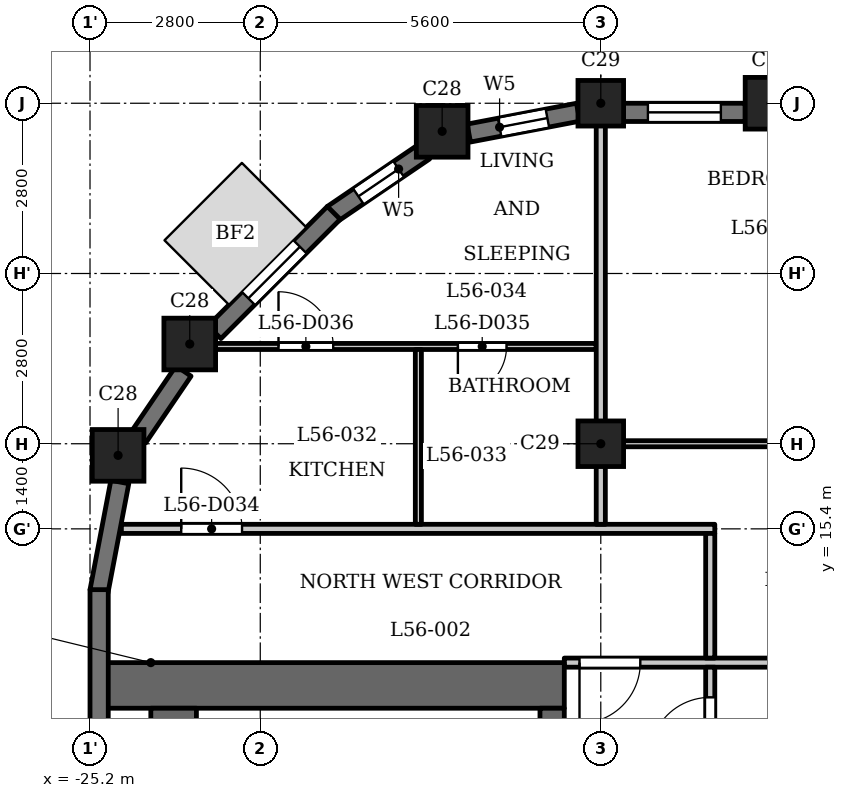
"""IFC4 building model, lengths in metres.
Left out: names, types, materials, properties, quantities, classifications, styles, units other than length and angle.
Written with IfcOpenShell. Run it as: python <this file> out.ifc"""

import sys

from ifc_helpers import new_model, si_unit, direction, frame, frame_2d, origin, origin_2d, place, context, subcontext, project, spatial, rectangle, extrude, element, fill, save


model = new_model("IFC4")
c1 = context("Model", 3, precision=1e-05, world=origin(), true_north=direction((0.0, 1.0)))
c2 = subcontext(c1, "Body", "Model", "MODEL_VIEW")
j1 = project(units=[si_unit("LENGTHUNIT", "METRE"), si_unit("PLANEANGLEUNIT", "RADIAN")], contexts=[c1])
p1 = place(None, origin())
s1 = spatial("IfcSite", under=j1, at=p1, CompositionType="ELEMENT")
p2 = place(p1, origin())
s2 = spatial("IfcBuilding", under=s1, at=p2, CompositionType="ELEMENT")
p3 = place(p2, frame((0.0, 0.0, 216.9)))
s3 = spatial("IfcBuildingStorey", under=s2, at=p3, CompositionType="ELEMENT", Elevation=216.9)
for number, where, z_axis, x_axis in (
    (1, (-14.0, 22.4, 0.0), (0.0, 0.0, 1.0), (1.0, 0.0, 0.0)),
    (2, (-19.409, 21.938, 0.0), (0.0, 0.0, 1.0), (1.0, 0.0, 0.0)),
    (3, (-23.56, 18.44, 0.0), (0.0, 0.0, 1.0), (1.0, 0.0, 0.0)),
    (4, (-24.738, 16.609, 0.0), (0.0, 0.0, 1.0), (1.0, 0.0, 0.0)),
):
    element("IfcColumn", number, at=place(p3, frame(where, z_axis=z_axis, x_axis=x_axis)), inside=s3, PredefinedType="COLUMN", context=c2, shape_type="SweptSolid", body=[
        extrude(rectangle(XDim=0.85, YDim=0.85, at=origin_2d()), origin(), (0.0, 0.0, 1.0), 3.5),
    ])
for number, where, z_axis, x_axis in (
    (5, (-16.8, 16.8, 0.0), (0.0, 0.0, 1.0), (1.0, 0.0, 0.0)),
    (6, (-16.8, 22.4, 0.0), (0.0, 0.0, 1.0), (1.0, 0.0, 0.0)),
):
    element("IfcColumn", number, at=place(p3, frame(where, z_axis=z_axis, x_axis=x_axis)), inside=s3, PredefinedType="COLUMN", context=c2, shape_type="SweptSolid", body=[
        extrude(rectangle(XDim=0.75, YDim=0.75, at=origin_2d()), origin(), (0.0, 0.0, 1.0), 3.5),
    ])
p4 = place(p3, frame((-14.425, 22.25, 0.0), z_axis=(0.0, 0.0, 1.0), x_axis=(-1.0, 0.0, 0.0)))
e7 = element("IfcWall", 7, at=p4, inside=s3, PredefinedType="SOLIDWALL", context=c2, shape_type="SweptSolid", body=[
    extrude(rectangle(XDim=2.0, YDim=0.3, at=frame_2d((1.0, 0.0))), origin(), (0.0, 0.0, 1.0), 2.5),
])
p5 = place(p4, frame((0.4, 0.0, 0.6)))
e8 = element("IfcOpeningElement", 8, at=p5, cuts=e7, PredefinedType="OPENING", context=c2, shape_type="SweptSolid", body=[
    extrude(rectangle(XDim=1.2, YDim=1.55, at=frame_2d((0.6, 0.775))), frame((0.0, 0.16, 0.0), z_axis=(0.0, -1.0, 0.0), x_axis=(1.0, 0.0, 0.0)), (0.0, 0.0, 1.0), 0.32),
])
p6 = place(p3, frame((-17.172, 22.253, 0.0), z_axis=(0.0, 0.0, 1.0), x_axis=(-0.982300037503, -0.187314271538, 0.0)))
e9 = element("IfcWall", 9, at=p6, inside=s3, PredefinedType="SOLIDWALL", context=c2, shape_type="SweptSolid", body=[
    extrude(rectangle(XDim=1.831, YDim=0.3, at=frame_2d((0.916, 0.0))), origin(), (0.0, 0.0, 1.0), 2.5),
])
p7 = place(p6, frame((0.516, 0.0, 0.6)))
e10 = element("IfcOpeningElement", 10, at=p7, cuts=e9, PredefinedType="OPENING", context=c2, shape_type="SweptSolid", body=[
    extrude(rectangle(XDim=0.8, YDim=1.55, at=frame_2d((0.4, 0.775))), frame((0.0, 0.16, 0.0), z_axis=(0.0, -1.0, 0.0), x_axis=(1.0, 0.0, 0.0)), (0.0, 0.0, 1.0), 0.32),
])
p8 = place(p3, frame((-19.698, 21.608, 0.0), z_axis=(0.0, 0.0, 1.0), x_axis=(-0.82705295608, -0.562124014644, 0.0)))
e11 = element("IfcWall", 11, at=p8, inside=s3, PredefinedType="SOLIDWALL", context=c2, shape_type="SweptSolid", body=[
    extrude(rectangle(XDim=1.831, YDim=0.3, at=frame_2d((0.916, 0.0))), origin(), (0.0, 0.0, 1.0), 2.5),
])
p9 = place(p8, frame((0.516, 0.0, 0.6)))
e12 = element("IfcOpeningElement", 12, at=p9, cuts=e11, PredefinedType="OPENING", context=c2, shape_type="SweptSolid", body=[
    extrude(rectangle(XDim=0.8, YDim=1.55, at=frame_2d((0.4, 0.775))), frame((0.0, 0.16, 0.0), z_axis=(0.0, -1.0, 0.0), x_axis=(1.0, 0.0, 0.0)), (0.0, 0.0, 1.0), 0.32),
])
p10 = place(p3, frame((-21.191, 20.597, 0.0), z_axis=(0.0, 0.0, 1.0), x_axis=(-0.707150767798, -0.707062791838, 0.0)))
e13 = element("IfcWall", 13, at=p10, inside=s3, PredefinedType="SOLIDWALL", context=c2, shape_type="SweptSolid", body=[
    extrude(rectangle(XDim=2.775, YDim=0.3, at=frame_2d((1.388, 0.0))), origin(), (0.0, 0.0, 1.0), 2.5),
])
p11 = place(p10, frame((0.788, 0.0, 0.6)))
e14 = element("IfcOpeningElement", 14, at=p11, cuts=e13, PredefinedType="OPENING", context=c2, shape_type="SweptSolid", body=[
    extrude(rectangle(XDim=1.2, YDim=1.55, at=frame_2d((0.6, 0.775))), frame((0.0, 0.16, 0.0), z_axis=(0.0, -1.0, 0.0), x_axis=(1.0, 0.0, 0.0)), (0.0, 0.0, 1.0), 0.32),
])
p12 = place(p3, frame((-23.662, 17.996, 0.0), z_axis=(0.0, 0.0, 1.0), x_axis=(-0.562149004813, -0.827035970432, 0.0)))
e15 = element("IfcWall", 15, at=p12, inside=s3, PredefinedType="SOLIDWALL", context=c2, shape_type="SweptSolid", body=[
    extrude(rectangle(XDim=1.327, YDim=0.3, at=frame_2d((0.664, 0.0))), origin(), (0.0, 0.0, 1.0), 2.5),
])
p13 = place(p3, frame((-24.709, 16.171, 0.0), z_axis=(0.0, 0.0, 1.0), x_axis=(-0.187442908742, -0.982275499014, 0.0)))
e16 = element("IfcWall", 16, at=p13, inside=s3, PredefinedType="SOLIDWALL", context=c2, shape_type="SweptSolid", body=[
    extrude(rectangle(XDim=1.831, YDim=0.3, at=frame_2d((0.916, 0.0))), origin(), (0.0, 0.0, 1.0), 2.5),
])
p14 = place(p3, frame((-25.05, 14.4, 0.0), z_axis=(0.0, 0.0, 1.0), x_axis=(0.0, -1.0, 0.0)))
e17 = element("IfcWall", 17, at=p14, inside=s3, PredefinedType="SOLIDWALL", context=c2, shape_type="SweptSolid", body=[
    extrude(rectangle(XDim=2.775, YDim=0.3, at=frame_2d((1.387, 0.0))), origin(), (0.0, 0.0, 1.0), 2.5),
])
p15 = place(p3, frame((-17.4, 12.825, 0.0), z_axis=(0.0, 0.0, 1.0), x_axis=(-1.0, 0.0, 0.0)))
e18 = element("IfcWall", 18, at=p15, inside=s3, PredefinedType="SHEAR", context=c2, shape_type="SweptSolid", body=[
    extrude(rectangle(XDim=7.6, YDim=0.75, at=frame_2d((3.8, 0.0))), origin(), (0.0, 0.0, 1.0), 3.2),
])
p16 = place(p3, frame((-17.6, -12.45, 0.0), z_axis=(0.0, 0.0, 1.0), x_axis=(0.0, 1.0, 0.0)))
e19 = element("IfcWall", 19, at=p16, inside=s3, PredefinedType="SHEAR", context=c2, shape_type="SweptSolid", body=[
    extrude(rectangle(XDim=24.9, YDim=0.4, at=frame_2d((12.45, 0.0))), origin(), (0.0, 0.0, 1.0), 3.2),
])
p17 = place(p16, frame((6.85, 0.0, 0.0)))
e20 = element("IfcOpeningElement", 20, at=p17, cuts=e19, PredefinedType="OPENING", context=c2, shape_type="SweptSolid", body=[
    extrude(rectangle(XDim=0.9, YDim=2.1, at=frame_2d((0.45, 1.05))), frame((0.0, 0.21, 0.0), z_axis=(0.0, -1.0, 0.0), x_axis=(1.0, 0.0, 0.0)), (0.0, 0.0, 1.0), 0.42),
])
p18 = place(p16, frame((10.45, 0.0, 0.0)))
e21 = element("IfcOpeningElement", 21, at=p18, cuts=e19, PredefinedType="OPENING", context=c2, shape_type="SweptSolid", body=[
    extrude(rectangle(XDim=0.9, YDim=2.1, at=frame_2d((0.45, 1.05))), frame((0.0, 0.21, 0.0), z_axis=(0.0, -1.0, 0.0), x_axis=(1.0, 0.0, 0.0)), (0.0, 0.0, 1.0), 0.42),
])
p19 = place(p16, frame((15.6, 0.0, 0.0)))
e22 = element("IfcOpeningElement", 22, at=p19, cuts=e19, PredefinedType="OPENING", context=c2, shape_type="SweptSolid", body=[
    extrude(rectangle(XDim=1.1, YDim=2.1, at=frame_2d((0.55, 1.05))), frame((0.0, 0.21, 0.0), z_axis=(0.0, -1.0, 0.0), x_axis=(1.0, 0.0, 0.0)), (0.0, 0.0, 1.0), 0.42),
])
p20 = place(p16, frame((18.0, 0.0, 0.0)))
e23 = element("IfcOpeningElement", 23, at=p20, cuts=e19, PredefinedType="OPENING", context=c2, shape_type="SweptSolid", body=[
    extrude(rectangle(XDim=1.1, YDim=2.1, at=frame_2d((0.55, 1.05))), frame((0.0, 0.21, 0.0), z_axis=(0.0, -1.0, 0.0), x_axis=(1.0, 0.0, 0.0)), (0.0, 0.0, 1.0), 0.42),
])
p21 = place(p16, frame((23.025, 0.0, 0.0)))
e24 = element("IfcOpeningElement", 24, at=p21, cuts=e19, PredefinedType="OPENING", context=c2, shape_type="SweptSolid", body=[
    extrude(rectangle(XDim=1.1, YDim=2.1, at=frame_2d((0.55, 1.05))), frame((0.0, 0.21, 0.0), z_axis=(0.0, -1.0, 0.0), x_axis=(1.0, 0.0, 0.0)), (0.0, 0.0, 1.0), 0.42),
])
p22 = place(p16, frame((0.775, 0.0, 0.0)))
e25 = element("IfcOpeningElement", 25, at=p22, cuts=e19, PredefinedType="OPENING", context=c2, shape_type="SweptSolid", body=[
    extrude(rectangle(XDim=1.1, YDim=2.1, at=frame_2d((0.55, 1.05))), frame((0.0, 0.21, 0.0), z_axis=(0.0, -1.0, 0.0), x_axis=(1.0, 0.0, 0.0)), (0.0, 0.0, 1.0), 0.42),
])
p23 = place(p16, frame((12.925, 0.0, 0.0)))
e26 = element("IfcOpeningElement", 26, at=p23, cuts=e19, PredefinedType="OPENING", context=c2, shape_type="SweptSolid", body=[
    extrude(rectangle(XDim=1.8, YDim=2.1, at=frame_2d((0.9, 1.05))), frame((0.0, 0.21, 0.0), z_axis=(0.0, -1.0, 0.0), x_axis=(1.0, 0.0, 0.0)), (0.0, 0.0, 1.0), 0.42),
])
p24 = place(p3, frame((-23.825, -12.45, 0.0), z_axis=(0.0, 0.0, 1.0), x_axis=(0.0, 1.0, 0.0)))
e27 = element("IfcWall", 27, at=p24, inside=s3, PredefinedType="SHEAR", context=c2, shape_type="SweptSolid", body=[
    extrude(rectangle(XDim=24.9, YDim=0.75, at=frame_2d((12.45, 0.0))), origin(), (0.0, 0.0, 1.0), 3.2),
])
p25 = place(p3, frame((-17.4, 13.2, 0.0), z_axis=(0.0, 0.0, 1.0), x_axis=(1.0, 0.0, 0.0)))
e28 = element("IfcWall", 28, at=p25, inside=s3, PredefinedType="PARTITIONING", context=c2, shape_type="SweptSolid", body=[
    extrude(rectangle(XDim=34.8, YDim=0.15, at=frame_2d((17.4, 0.0))), origin(), (0.0, 0.0, 1.0), 3.2),
])
p26 = place(p25, frame((0.25, 0.0, 0.0)))
e29 = element("IfcOpeningElement", 29, at=p26, cuts=e28, PredefinedType="OPENING", context=c2, shape_type="SweptSolid", body=[
    extrude(rectangle(XDim=1.0, YDim=2.1, at=frame_2d((0.5, 1.05))), frame((0.0, 0.085, 0.0), z_axis=(0.0, -1.0, 0.0), x_axis=(1.0, 0.0, 0.0)), (0.0, 0.0, 1.0), 0.17),
])
p27 = place(p25, frame((33.65, 0.0, 0.0)))
e30 = element("IfcOpeningElement", 30, at=p27, cuts=e28, PredefinedType="OPENING", context=c2, shape_type="SweptSolid", body=[
    extrude(rectangle(XDim=1.0, YDim=2.1, at=frame_2d((0.5, 1.05))), frame((0.0, 0.085, 0.0), z_axis=(0.0, -1.0, 0.0), x_axis=(1.0, 0.0, 0.0)), (0.0, 0.0, 1.0), 0.17),
])
p28 = place(p25, frame((15.75, 0.0, 0.0)))
e31 = element("IfcOpeningElement", 31, at=p28, cuts=e28, PredefinedType="OPENING", context=c2, shape_type="SweptSolid", body=[
    extrude(rectangle(XDim=1.0, YDim=2.1, at=frame_2d((0.5, 1.05))), frame((0.0, 0.085, 0.0), z_axis=(0.0, -1.0, 0.0), x_axis=(1.0, 0.0, 0.0)), (0.0, 0.0, 1.0), 0.17),
])
p29 = place(p25, frame((26.95, 0.0, 0.0)))
e32 = element("IfcOpeningElement", 32, at=p29, cuts=e28, PredefinedType="OPENING", context=c2, shape_type="SweptSolid", body=[
    extrude(rectangle(XDim=1.0, YDim=2.1, at=frame_2d((0.5, 1.05))), frame((0.0, 0.085, 0.0), z_axis=(0.0, -1.0, 0.0), x_axis=(1.0, 0.0, 0.0)), (0.0, 0.0, 1.0), 0.17),
])
p30 = place(p25, frame((29.75, 0.0, 0.0)))
e33 = element("IfcOpeningElement", 33, at=p30, cuts=e28, PredefinedType="OPENING", context=c2, shape_type="SweptSolid", body=[
    extrude(rectangle(XDim=1.0, YDim=2.1, at=frame_2d((0.5, 1.05))), frame((0.0, 0.085, 0.0), z_axis=(0.0, -1.0, 0.0), x_axis=(1.0, 0.0, 0.0)), (0.0, 0.0, 1.0), 0.17),
])
p31 = place(p3, frame((-24.684, 15.4, 0.0), z_axis=(0.0, 0.0, 1.0), x_axis=(1.0, 0.0, 0.0)))
e34 = element("IfcWall", 34, at=p31, inside=s3, PredefinedType="PARTITIONING", context=c2, shape_type="SweptSolid", body=[
    extrude(rectangle(XDim=9.759, YDim=0.15, at=frame_2d((4.879, 0.0))), origin(), (0.0, 0.0, 1.0), 3.2),
])
p32 = place(p31, frame((0.984, 0.0, 0.0)))
e35 = element("IfcOpeningElement", 35, at=p32, cuts=e34, PredefinedType="OPENING", context=c2, shape_type="SweptSolid", body=[
    extrude(rectangle(XDim=1.0, YDim=2.1, at=frame_2d((0.5, 1.05))), frame((0.0, 0.085, 0.0), z_axis=(0.0, -1.0, 0.0), x_axis=(1.0, 0.0, 0.0)), (0.0, 0.0, 1.0), 0.17),
])
p33 = place(p3, frame((-16.725, 16.8, 0.0), z_axis=(0.0, 0.0, 1.0), x_axis=(1.0, 0.0, 0.0)))
e36 = element("IfcWall", 36, at=p33, inside=s3, PredefinedType="PARTITIONING", context=c2, shape_type="SweptSolid", body=[
    extrude(rectangle(XDim=33.45, YDim=0.1, at=frame_2d((16.725, 0.0))), origin(), (0.0, 0.0, 1.0), 3.2),
])
p34 = place(p33, frame((11.675, 0.0, 0.0)))
e37 = element("IfcOpeningElement", 37, at=p34, cuts=e36, PredefinedType="OPENING", context=c2, shape_type="SweptSolid", body=[
    extrude(rectangle(XDim=0.9, YDim=2.1, at=frame_2d((0.45, 1.05))), frame((0.0, 0.06, 0.0), z_axis=(0.0, -1.0, 0.0), x_axis=(1.0, 0.0, 0.0)), (0.0, 0.0, 1.0), 0.12),
])
p35 = place(p33, frame((9.575, 0.0, 0.0)))
e38 = element("IfcOpeningElement", 38, at=p35, cuts=e36, PredefinedType="OPENING", context=c2, shape_type="SweptSolid", body=[
    extrude(rectangle(XDim=0.9, YDim=2.1, at=frame_2d((0.45, 1.05))), frame((0.0, 0.06, 0.0), z_axis=(0.0, -1.0, 0.0), x_axis=(1.0, 0.0, 0.0)), (0.0, 0.0, 1.0), 0.12),
])
p36 = place(p33, frame((17.375, 0.0, 0.0)))
e39 = element("IfcOpeningElement", 39, at=p36, cuts=e36, PredefinedType="OPENING", context=c2, shape_type="SweptSolid", body=[
    extrude(rectangle(XDim=0.8, YDim=2.1, at=frame_2d((0.4, 1.05))), frame((0.0, 0.06, 0.0), z_axis=(0.0, -1.0, 0.0), x_axis=(1.0, 0.0, 0.0)), (0.0, 0.0, 1.0), 0.12),
])
p37 = place(p33, frame((19.525, 0.0, 0.0)))
e40 = element("IfcOpeningElement", 40, at=p37, cuts=e36, PredefinedType="OPENING", context=c2, shape_type="SweptSolid", body=[
    extrude(rectangle(XDim=0.9, YDim=2.1, at=frame_2d((0.45, 1.05))), frame((0.0, 0.06, 0.0), z_axis=(0.0, -1.0, 0.0), x_axis=(1.0, 0.0, 0.0)), (0.0, 0.0, 1.0), 0.12),
])
p38 = place(p33, frame((23.775, 0.0, 0.0)))
e41 = element("IfcOpeningElement", 41, at=p38, cuts=e36, PredefinedType="OPENING", context=c2, shape_type="SweptSolid", body=[
    extrude(rectangle(XDim=0.9, YDim=2.1, at=frame_2d((0.45, 1.05))), frame((0.0, 0.06, 0.0), z_axis=(0.0, -1.0, 0.0), x_axis=(1.0, 0.0, 0.0)), (0.0, 0.0, 1.0), 0.12),
])
p39 = place(p33, frame((26.125, 0.0, 0.0)))
e42 = element("IfcOpeningElement", 42, at=p39, cuts=e36, PredefinedType="OPENING", context=c2, shape_type="SweptSolid", body=[
    extrude(rectangle(XDim=0.9, YDim=2.1, at=frame_2d((0.45, 1.05))), frame((0.0, 0.06, 0.0), z_axis=(0.0, -1.0, 0.0), x_axis=(1.0, 0.0, 0.0)), (0.0, 0.0, 1.0), 0.12),
])
p40 = place(p33, frame((32.075, 0.0, 0.0)))
e43 = element("IfcOpeningElement", 43, at=p40, cuts=e36, PredefinedType="OPENING", context=c2, shape_type="SweptSolid", body=[
    extrude(rectangle(XDim=0.8, YDim=2.1, at=frame_2d((0.4, 1.05))), frame((0.0, 0.06, 0.0), z_axis=(0.0, -1.0, 0.0), x_axis=(1.0, 0.0, 0.0)), (0.0, 0.0, 1.0), 0.12),
])
p41 = place(p33, frame((29.175, 0.0, 0.0)))
e44 = element("IfcOpeningElement", 44, at=p41, cuts=e36, PredefinedType="OPENING", context=c2, shape_type="SweptSolid", body=[
    extrude(rectangle(XDim=0.9, YDim=2.1, at=frame_2d((0.45, 1.05))), frame((0.0, 0.06, 0.0), z_axis=(0.0, -1.0, 0.0), x_axis=(1.0, 0.0, 0.0)), (0.0, 0.0, 1.0), 0.12),
])
p42 = place(p3, frame((-23.43, 18.4, 0.0), z_axis=(0.0, 0.0, 1.0), x_axis=(1.0, 0.0, 0.0)))
e45 = element("IfcWall", 45, at=p42, inside=s3, PredefinedType="PARTITIONING", context=c2, shape_type="SweptSolid", body=[
    extrude(rectangle(XDim=6.555, YDim=0.1, at=frame_2d((3.277, 0.0))), origin(), (0.0, 0.0, 1.0), 3.2),
])
p43 = place(p42, frame((4.28, 0.0, 0.0)))
e46 = element("IfcOpeningElement", 46, at=p43, cuts=e45, PredefinedType="OPENING", context=c2, shape_type="SweptSolid", body=[
    extrude(rectangle(XDim=0.8, YDim=2.1, at=frame_2d((0.4, 1.05))), frame((0.0, 0.06, 0.0), z_axis=(0.0, -1.0, 0.0), x_axis=(1.0, 0.0, 0.0)), (0.0, 0.0, 1.0), 0.12),
])
p44 = place(p42, frame((1.33, 0.0, 0.0)))
e47 = element("IfcOpeningElement", 47, at=p44, cuts=e45, PredefinedType="OPENING", context=c2, shape_type="SweptSolid", body=[
    extrude(rectangle(XDim=0.9, YDim=2.1, at=frame_2d((0.45, 1.05))), frame((0.0, 0.06, 0.0), z_axis=(0.0, -1.0, 0.0), x_axis=(1.0, 0.0, 0.0)), (0.0, 0.0, 1.0), 0.12),
])
p45 = place(p3, frame((-19.8, 15.475, 0.0), z_axis=(0.0, 0.0, 1.0), x_axis=(0.0, 1.0, 0.0)))
e48 = element("IfcWall", 48, at=p45, inside=s3, PredefinedType="PARTITIONING", context=c2, shape_type="SweptSolid", body=[
    extrude(rectangle(XDim=2.875, YDim=0.1, at=frame_2d((1.438, 0.0))), origin(), (0.0, 0.0, 1.0), 3.2),
])
p46 = place(p3, frame((-16.8, 15.475, 0.0), z_axis=(0.0, 0.0, 1.0), x_axis=(0.0, 1.0, 0.0)))
e49 = element("IfcWall", 49, at=p46, inside=s3, PredefinedType="PARTITIONING", context=c2, shape_type="SweptSolid", body=[
    extrude(rectangle(XDim=6.835, YDim=0.15, at=frame_2d((3.417, 0.0))), origin(), (0.0, 0.0, 1.0), 2.55),
])
p47 = place(p3, frame((-15.0, 6.769, 0.0), z_axis=(0.0, 0.0, 1.0), x_axis=(0.0, 1.0, 0.0)))
e50 = element("IfcWall", 50, at=p47, inside=s3, PredefinedType="PARTITIONING", context=c2, shape_type="SweptSolid", body=[
    extrude(rectangle(XDim=6.356, YDim=0.15, at=frame_2d((3.178, 0.0))), origin(), (0.0, 0.0, 1.0), 3.2),
])
p48 = place(p47, frame((4.86, 0.0, 0.0)))
e51 = element("IfcOpeningElement", 51, at=p48, cuts=e50, PredefinedType="OPENING", context=c2, shape_type="SweptSolid", body=[
    extrude(rectangle(XDim=1.0, YDim=2.1, at=frame_2d((0.5, 1.05))), frame((0.0, 0.085, 0.0), z_axis=(0.0, -1.0, 0.0), x_axis=(1.0, 0.0, 0.0)), (0.0, 0.0, 1.0), 0.17),
])
p49 = place(p3, frame((-15.0, 13.275, 0.0), z_axis=(0.0, 0.0, 1.0), x_axis=(0.0, 1.0, 0.0)))
e52 = element("IfcWall", 52, at=p49, inside=s3, PredefinedType="PARTITIONING", context=c2, shape_type="SweptSolid", body=[
    extrude(rectangle(XDim=2.05, YDim=0.15, at=frame_2d((1.025, 0.0))), origin(), (0.0, 0.0, 1.0), 3.2),
])
p50 = place(p48, origin())
e53 = element("IfcDoor", 53, at=p50, inside=s3, OperationType="SINGLE_SWING_RIGHT", PredefinedType="DOOR", context=c2, shape_type="SweptSolid", body=[
    extrude(rectangle(XDim=1.0, YDim=2.1, at=frame_2d((0.5, 1.05))), frame((0.0, 0.025, 0.0), z_axis=(0.0, -1.0, 0.0), x_axis=(1.0, 0.0, 0.0)), (0.0, 0.0, 1.0), 0.05),
])
fill(e51, e53)
p51 = place(p26, origin())
e54 = element("IfcDoor", 54, at=p51, inside=s3, OperationType="SINGLE_SWING_LEFT", PredefinedType="DOOR", context=c2, shape_type="SweptSolid", body=[
    extrude(rectangle(XDim=1.0, YDim=2.1, at=frame_2d((0.5, 1.05))), frame((0.0, 0.025, 0.0), z_axis=(0.0, -1.0, 0.0), x_axis=(1.0, 0.0, 0.0)), (0.0, 0.0, 1.0), 0.05),
])
fill(e29, e54)
p52 = place(p32, origin())
e55 = element("IfcDoor", 55, at=p52, inside=s3, OperationType="SINGLE_SWING_RIGHT", PredefinedType="DOOR", context=c2, shape_type="SweptSolid", body=[
    extrude(rectangle(XDim=1.0, YDim=2.1, at=frame_2d((0.5, 1.05))), frame((0.0, 0.025, 0.0), z_axis=(0.0, -1.0, 0.0), x_axis=(1.0, 0.0, 0.0)), (0.0, 0.0, 1.0), 0.05),
])
fill(e35, e55)
p53 = place(p43, origin())
e56 = element("IfcDoor", 56, at=p53, inside=s3, OperationType="SINGLE_SWING_LEFT", PredefinedType="DOOR", context=c2, shape_type="SweptSolid", body=[
    extrude(rectangle(XDim=0.8, YDim=2.1, at=frame_2d((0.4, 1.05))), frame((0.0, 0.025, 0.0), z_axis=(0.0, -1.0, 0.0), x_axis=(1.0, 0.0, 0.0)), (0.0, 0.0, 1.0), 0.05),
])
fill(e46, e56)
p54 = place(p44, origin())
e57 = element("IfcDoor", 57, at=p54, inside=s3, OperationType="SINGLE_SWING_RIGHT", PredefinedType="DOOR", context=c2, shape_type="SweptSolid", body=[
    extrude(rectangle(XDim=0.9, YDim=2.1, at=frame_2d((0.45, 1.05))), frame((0.0, 0.025, 0.0), z_axis=(0.0, -1.0, 0.0), x_axis=(1.0, 0.0, 0.0)), (0.0, 0.0, 1.0), 0.05),
])
fill(e47, e57)
p55 = place(p5, origin())
e58 = element("IfcWindow", 58, at=p55, inside=s3, PartitioningType="SINGLE_PANEL", PredefinedType="WINDOW", context=c2, shape_type="SweptSolid", body=[
    extrude(rectangle(XDim=1.2, YDim=1.55, at=frame_2d((0.6, 0.775))), frame((0.0, 0.03, 0.0), z_axis=(0.0, -1.0, 0.0), x_axis=(1.0, 0.0, 0.0)), (0.0, 0.0, 1.0), 0.06),
])
fill(e8, e58)
p56 = place(p7, origin())
e59 = element("IfcWindow", 59, at=p56, inside=s3, PartitioningType="SINGLE_PANEL", PredefinedType="WINDOW", context=c2, shape_type="SweptSolid", body=[
    extrude(rectangle(XDim=0.8, YDim=1.55, at=frame_2d((0.4, 0.775))), frame((0.0, 0.03, 0.0), z_axis=(0.0, -1.0, 0.0), x_axis=(1.0, 0.0, 0.0)), (0.0, 0.0, 1.0), 0.06),
])
fill(e10, e59)
p57 = place(p9, origin())
e60 = element("IfcWindow", 60, at=p57, inside=s3, PartitioningType="SINGLE_PANEL", PredefinedType="WINDOW", context=c2, shape_type="SweptSolid", body=[
    extrude(rectangle(XDim=0.8, YDim=1.55, at=frame_2d((0.4, 0.775))), frame((0.0, 0.03, 0.0), z_axis=(0.0, -1.0, 0.0), x_axis=(1.0, 0.0, 0.0)), (0.0, 0.0, 1.0), 0.06),
])
fill(e12, e60)
p58 = place(p11, origin())
e61 = element("IfcWindow", 61, at=p58, inside=s3, PartitioningType="SINGLE_PANEL", PredefinedType="WINDOW", context=c2, shape_type="SweptSolid", body=[
    extrude(rectangle(XDim=1.2, YDim=1.55, at=frame_2d((0.6, 0.775))), frame((0.0, 0.03, 0.0), z_axis=(0.0, -1.0, 0.0), x_axis=(1.0, 0.0, 0.0)), (0.0, 0.0, 1.0), 0.06),
])
fill(e14, e61)
save(model, sys.argv[1])
